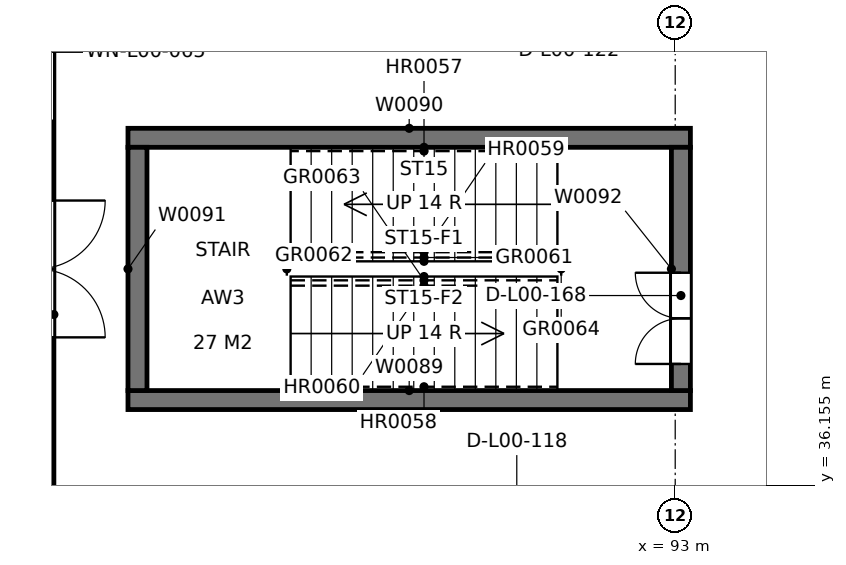
"""IFC4 building model, lengths in metres.
Left out: names, types, materials, properties, quantities, classifications, styles, units other than length and angle.
Written with IfcOpenShell. Run it as: python <this file> out.ifc"""

import sys

from ifc_helpers import new_model, si_unit, direction, frame, frame_2d, origin, place, context, subcontext, project, spatial, rectangle, extrude, element, fill, save


model = new_model("IFC4")
c1 = context("Model", 3, precision=1e-05, world=origin(), true_north=direction((0.0, 1.0)))
c2 = subcontext(c1, "Body", "Model", "MODEL_VIEW")
j1 = project(units=[si_unit("LENGTHUNIT", "METRE"), si_unit("PLANEANGLEUNIT", "RADIAN")], contexts=[c1])
p1 = place(None, origin())
s1 = spatial("IfcSite", under=j1, at=p1, CompositionType="ELEMENT")
p2 = place(p1, origin())
s2 = spatial("IfcBuilding", under=s1, at=p2, CompositionType="ELEMENT")
p3 = place(p2, origin())
s3 = spatial("IfcBuildingStorey", under=s2, at=p3, CompositionType="ELEMENT", Elevation=0.0)
for number, where, z_axis, x_axis in (
    (1, (85.8, 37.275, 0.0), (0.0, 0.0, 1.0), (1.0, 0.0, 0.0)),
    (2, (85.8, 40.725, 0.0), (0.0, 0.0, 1.0), (1.0, 0.0, 0.0)),
):
    element("IfcWall", number, at=place(p3, frame(where, z_axis=z_axis, x_axis=x_axis)), inside=s3, PredefinedType="SOLIDWALL", context=c2, shape_type="SweptSolid", body=[
        extrude(rectangle(XDim=7.4, YDim=0.25, at=frame_2d((3.7, 0.0))), origin(), (0.0, 0.0, 1.0), 4.8),
    ])
p4 = place(p3, frame((85.925, 37.4, 0.0), z_axis=(0.0, 0.0, 1.0), x_axis=(0.0, 1.0, 0.0)))
e3 = element("IfcWall", 3, at=p4, inside=s3, PredefinedType="SOLIDWALL", context=c2, shape_type="SweptSolid", body=[
    extrude(rectangle(XDim=3.2, YDim=0.25, at=frame_2d((1.6, 0.0))), origin(), (0.0, 0.0, 1.0), 4.8),
])
p5 = place(p3, frame((93.075, 37.4, 0.0), z_axis=(0.0, 0.0, 1.0), x_axis=(0.0, 1.0, 0.0)))
e4 = element("IfcWall", 4, at=p5, inside=s3, PredefinedType="SOLIDWALL", context=c2, shape_type="SweptSolid", body=[
    extrude(rectangle(XDim=3.2, YDim=0.25, at=frame_2d((1.6, 0.0))), origin(), (0.0, 0.0, 1.0), 4.8),
])
p6 = place(p5, frame((0.35, 0.0, 0.0)))
e5 = element("IfcOpeningElement", 5, at=p6, cuts=e4, PredefinedType="OPENING", context=c2, shape_type="SweptSolid", body=[
    extrude(rectangle(XDim=1.2, YDim=2.1, at=frame_2d((0.6, 1.05))), frame((0.0, 0.135, 0.0), z_axis=(0.0, -1.0, 0.0), x_axis=(1.0, 0.0, 0.0)), (0.0, 0.0, 1.0), 0.27),
])
p7 = place(p3, frame((84.6, 42.3, 0.0), z_axis=(0.0, 0.0, 1.0), x_axis=(0.0, -1.0, 0.0)))
e6 = element("IfcWall", 6, at=p7, inside=s3, PredefinedType="SOLIDWALL", context=c2, shape_type="SweptSolid", body=[
    extrude(rectangle(XDim=7.8, YDim=0.45, at=frame_2d((3.9, 0.0))), origin(), (0.0, 0.0, 1.0), 3.84),
])
p8 = place(p7, frame((2.4, 0.0, 0.0)))
e7 = element("IfcOpeningElement", 7, at=p8, cuts=e6, PredefinedType="OPENING", context=c2, shape_type="SweptSolid", body=[
    extrude(rectangle(XDim=1.8, YDim=2.1, at=frame_2d((0.9, 1.05))), frame((0.0, 0.235, 0.0), z_axis=(0.0, -1.0, 0.0), x_axis=(1.0, 0.0, 0.0)), (0.0, 0.0, 1.0), 0.47),
])
p9 = place(p7, frame((7.125, 0.0, 1.8)))
e8 = element("IfcOpeningElement", 8, at=p9, cuts=e6, PredefinedType="OPENING", context=c2, shape_type="SweptSolid", body=[
    extrude(rectangle(XDim=0.55, YDim=0.6, at=frame_2d((0.275, 0.3))), frame((0.0, 0.235, 0.0), z_axis=(0.0, -1.0, 0.0), x_axis=(1.0, 0.0, 0.0)), (0.0, 0.0, 1.0), 0.47),
])
p10 = place(p7, frame((0.15, 0.0, 0.9)))
e9 = element("IfcOpeningElement", 9, at=p10, cuts=e6, PredefinedType="OPENING", context=c2, shape_type="SweptSolid", body=[
    extrude(rectangle(XDim=1.2, YDim=2.4, at=frame_2d((0.6, 1.2))), frame((0.0, 0.235, 0.0), z_axis=(0.0, -1.0, 0.0), x_axis=(1.0, 0.0, 0.0)), (0.0, 0.0, 1.0), 0.47),
])
p11 = place(p6, origin())
e10 = element("IfcDoor", 10, at=p11, inside=s3, OperationType="DOUBLE_DOOR_SINGLE_SWING", PredefinedType="DOOR", context=c2, shape_type="SweptSolid", body=[
    extrude(rectangle(XDim=1.2, YDim=2.1, at=frame_2d((0.6, 1.05))), frame((0.0, 0.025, 0.0), z_axis=(0.0, -1.0, 0.0), x_axis=(1.0, 0.0, 0.0)), (0.0, 0.0, 1.0), 0.05),
])
fill(e5, e10)
save(model, sys.argv[1])
